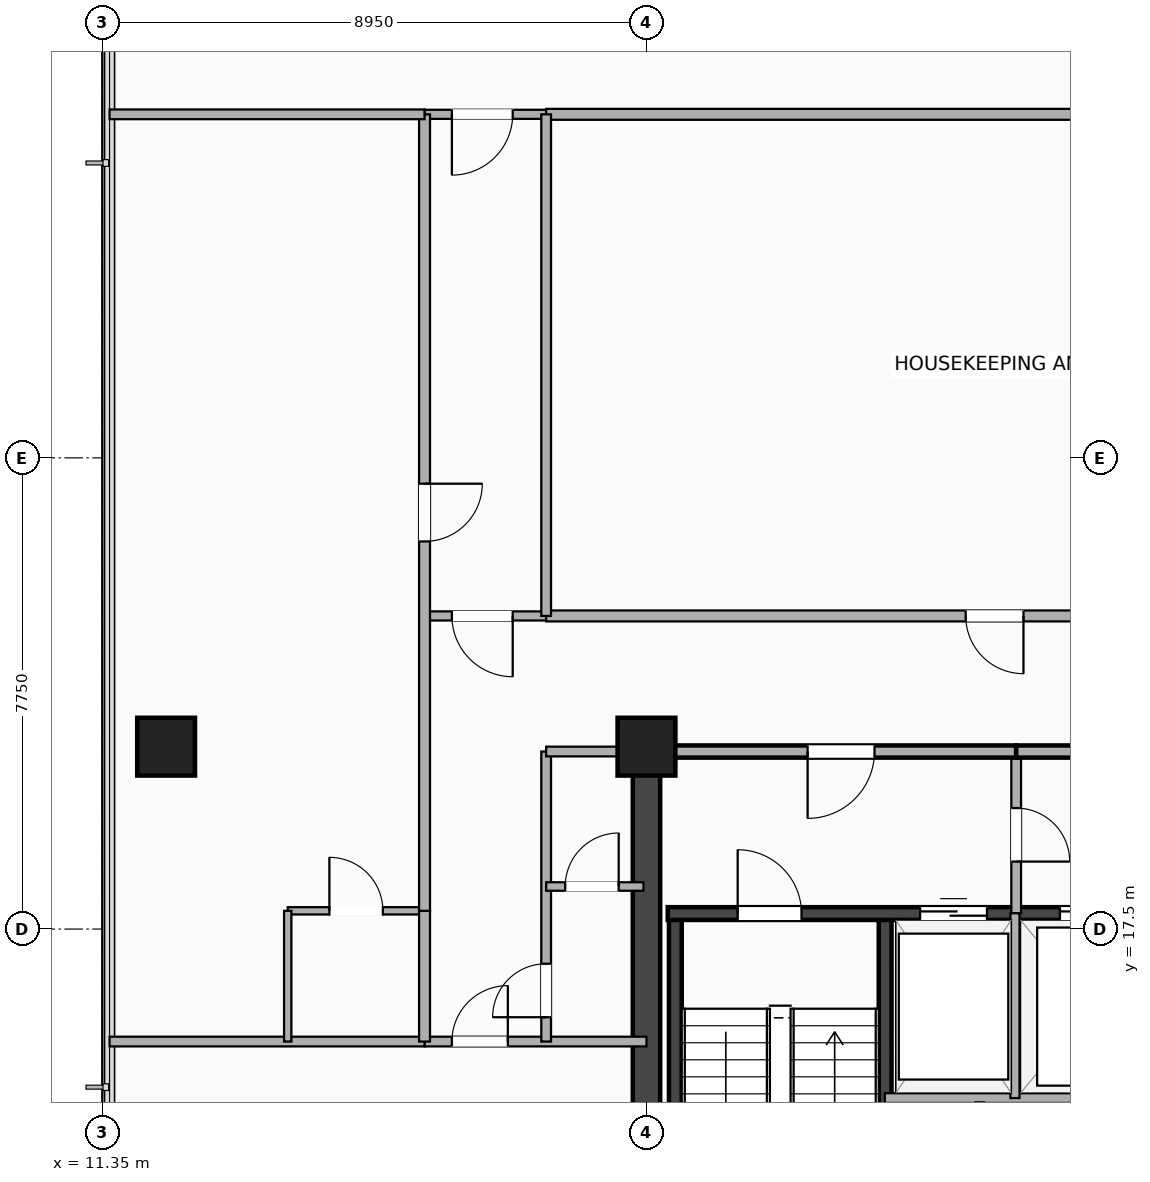
"""IFC4 building model, lengths in metres.
Left out: names, types, materials, properties, quantities, classifications, styles, units other than length and angle.
Written with IfcOpenShell. Run it as: python <this file> out.ifc"""

import sys

from ifc_helpers import new_model, si_unit, direction, frame, frame_2d, origin, origin_2d, place, context, subcontext, project, spatial, rectangle, extrude, element, fill, save


model = new_model("IFC4")
c1 = context("Model", 3, precision=1e-05, world=origin(), true_north=direction((0.0, 1.0)))
c2 = subcontext(c1, "Body", "Model", "MODEL_VIEW")
j1 = project(units=[si_unit("LENGTHUNIT", "METRE"), si_unit("PLANEANGLEUNIT", "RADIAN")], contexts=[c1])
p1 = place(None, origin())
s1 = spatial("IfcSite", under=j1, at=p1, CompositionType="ELEMENT")
p2 = place(p1, origin())
s2 = spatial("IfcBuilding", under=s1, at=p2, CompositionType="ELEMENT")
p3 = place(p2, frame((0.0, 0.0, 224.9)))
s3 = spatial("IfcBuildingStorey", under=s2, at=p3, CompositionType="ELEMENT", Elevation=224.9)
p4 = place(p3, frame((20.3, 3.5, 0.0), z_axis=(0.0, 0.0, 1.0), x_axis=(0.0, 1.0, 0.0)))
e1 = element("IfcWall", 1, at=p4, inside=s3, PredefinedType="SHEAR", context=c2, shape_type="SweptSolid", body=[
    extrude(rectangle(XDim=16.9, YDim=0.45, at=frame_2d((8.45, 0.0))), origin(), (0.0, 0.0, 1.0), 3.26),
])
for number, where, z_axis, x_axis in (
    (2, (20.775, 9.745, 0.0), (0.0, 0.0, 1.0), (0.0, 1.0, 0.0)),
    (3, (24.225, 9.745, 0.0), (0.0, 0.0, 1.0), (0.0, 1.0, 0.0)),
):
    element("IfcWall", number, at=place(p3, frame(where, z_axis=z_axis, x_axis=x_axis)), inside=s3, PredefinedType="SHEAR", context=c2, shape_type="SweptSolid", body=[
        extrude(rectangle(XDim=8.01, YDim=0.21, at=frame_2d((4.005, 0.0))), origin(), (0.0, 0.0, 1.0), 3.26),
    ])
p5 = place(p3, frame((20.65, 17.755, 0.0), z_axis=(0.0, 0.0, 1.0), x_axis=(1.0, 0.0, 0.0)))
e4 = element("IfcWall", 4, at=p5, inside=s3, PredefinedType="SHEAR", context=c2, shape_type="SweptSolid", body=[
    extrude(rectangle(XDim=8.3, YDim=0.21, at=frame_2d((4.15, 0.0))), origin(), (0.0, 0.0, 1.0), 3.26),
])
p6 = place(p5, frame((2.2, 0.0, 0.0), z_axis=(0.0, 0.0, 1.0), x_axis=(-1.0, 0.0, 0.0)))
e5 = element("IfcOpeningElement", 5, at=p6, cuts=e4, PredefinedType="OPENING", context=c2, shape_type="SweptSolid", body=[
    extrude(rectangle(XDim=1.05, YDim=2.15, at=frame_2d((0.525, 1.075))), frame((0.0, 0.115, 0.0), z_axis=(0.0, -1.0, 0.0), x_axis=(1.0, 0.0, 0.0)), (0.0, 0.0, 1.0), 0.23),
])
p7 = place(p5, frame((4.15, 0.0, 0.0)))
e6 = element("IfcOpeningElement", 6, at=p7, cuts=e4, PredefinedType="OPENING", context=c2, shape_type="SweptSolid", body=[
    extrude(rectangle(XDim=1.1, YDim=2.18, at=frame_2d((0.55, 1.09))), frame((0.0, 0.115, 0.0), z_axis=(0.0, -1.0, 0.0), x_axis=(1.0, 0.0, 0.0)), (0.0, 0.0, 1.0), 0.23),
])
p8 = place(p5, frame((6.45, 0.0, 0.0)))
e7 = element("IfcOpeningElement", 7, at=p8, cuts=e4, PredefinedType="OPENING", context=c2, shape_type="SweptSolid", body=[
    extrude(rectangle(XDim=1.12, YDim=2.2, at=frame_2d((0.56, 1.1))), frame((0.0, 0.115, 0.0), z_axis=(0.0, -1.0, 0.0), x_axis=(1.0, 0.0, 0.0)), (0.0, 0.0, 1.0), 0.23),
])
for number, where, z_axis, x_axis in (
    (8, (20.3, 20.5, -0.24), (0.0, 0.0, 1.0), (1.0, 0.0, 0.0)),
    (9, (12.4, 20.5, -0.24), (0.0, 0.0, 1.0), (1.0, 0.0, 0.0)),
):
    element("IfcColumn", number, at=place(p3, frame(where, z_axis=z_axis, x_axis=x_axis)), inside=s3, PredefinedType="COLUMN", context=c2, shape_type="SweptSolid", body=[
        extrude(rectangle(XDim=0.95, YDim=0.95, at=origin_2d()), origin(), (0.0, 0.0, 1.0), 3.5),
    ])
p9 = place(p3, frame((26.38, 17.76, 0.0), z_axis=(0.0, 0.0, 1.0), x_axis=(0.0, 1.0, 0.0)))
e10 = element("IfcWall", 10, at=p9, inside=s3, PredefinedType="PARTITIONING", context=c2, shape_type="SweptSolid", body=[
    extrude(rectangle(XDim=2.66, YDim=0.16, at=frame_2d((1.33, 0.0))), origin(), (0.0, 0.0, 1.0), 2.706),
])
p10 = place(p9, frame((0.85, 0.0, 0.0)))
e11 = element("IfcOpeningElement", 11, at=p10, cuts=e10, PredefinedType="OPENING", context=c2, shape_type="SweptSolid", body=[
    extrude(rectangle(XDim=0.88, YDim=2.08, at=frame_2d((0.44, 1.04))), frame((0.0, 0.09, 0.0), z_axis=(0.0, -1.0, 0.0), x_axis=(1.0, 0.0, 0.0)), (0.0, 0.0, 1.0), 0.18),
])
p11 = place(p3, frame((24.22, 14.72, 0.0), z_axis=(0.0, 0.0, 1.0), x_axis=(1.0, 0.0, 0.0)))
e12 = element("IfcWall", 12, at=p11, inside=s3, PredefinedType="PARTITIONING", context=c2, shape_type="SweptSolid", body=[
    extrude(rectangle(XDim=4.73, YDim=0.16, at=frame_2d((2.365, 0.0))), origin(), (0.0, 0.0, 1.0), 3.26),
])
p12 = place(p3, frame((26.36, 14.72, 0.0), z_axis=(0.0, 0.0, 1.0), x_axis=(0.0, 1.0, 0.0)))
e13 = element("IfcWall", 13, at=p12, inside=s3, PredefinedType="PARTITIONING", context=c2, shape_type="SweptSolid", body=[
    extrude(rectangle(XDim=3.04, YDim=0.15, at=frame_2d((1.52, 0.0))), origin(), (0.0, 0.0, 1.0), 3.26),
])
p13 = place(p3, frame((20.65, 20.42, 0.0), z_axis=(0.0, 0.0, 1.0), x_axis=(1.0, 0.0, 0.0)))
e14 = element("IfcWall", 14, at=p13, inside=s3, PredefinedType="PARTITIONING", context=c2, shape_type="SweptSolid", body=[
    extrude(rectangle(XDim=5.73, YDim=0.2, at=frame_2d((2.865, 0.0))), origin(), (0.0, 0.0, 1.0), 2.472),
])
p14 = place(p13, frame((2.3, 0.0, 0.0)))
e15 = element("IfcOpeningElement", 15, at=p14, cuts=e14, PredefinedType="OPENING", context=c2, shape_type="SweptSolid", body=[
    extrude(rectangle(XDim=1.1, YDim=2.15, at=frame_2d((0.55, 1.075))), frame((0.0, 0.11, 0.0), z_axis=(0.0, -1.0, 0.0), x_axis=(1.0, 0.0, 0.0)), (0.0, 0.0, 1.0), 0.22),
])
p15 = place(p3, frame((26.38, 20.42, 0.0), z_axis=(0.0, 0.0, 1.0), x_axis=(1.0, 0.0, 0.0)))
e16 = element("IfcWall", 16, at=p15, inside=s3, PredefinedType="PARTITIONING", context=c2, shape_type="SweptSolid", body=[
    extrude(rectangle(XDim=2.82, YDim=0.2, at=frame_2d((1.41, 0.0))), origin(), (0.0, 0.0, 1.0), 2.472),
])
p16 = place(p3, frame((16.65, 15.65, 0.0), z_axis=(0.0, 0.0, 1.0), x_axis=(1.0, 0.0, 0.0)))
e17 = element("IfcWall", 17, at=p16, inside=s3, PredefinedType="PARTITIONING", context=c2, shape_type="SweptSolid", body=[
    extrude(rectangle(XDim=3.65, YDim=0.16, at=frame_2d((1.825, 0.0))), origin(), (0.0, 0.0, 1.0), 2.472),
])
p17 = place(p16, frame((1.37, 0.0, 0.0), z_axis=(0.0, 0.0, 1.0), x_axis=(-1.0, 0.0, 0.0)))
e18 = element("IfcOpeningElement", 18, at=p17, cuts=e17, PredefinedType="OPENING", context=c2, shape_type="SweptSolid", body=[
    extrude(rectangle(XDim=0.92, YDim=2.08, at=frame_2d((0.46, 1.04))), frame((0.0, 0.09, 0.0), z_axis=(0.0, -1.0, 0.0), x_axis=(1.0, 0.0, 0.0)), (0.0, 0.0, 1.0), 0.18),
])
p18 = place(p3, frame((18.65, 15.65, 0.0), z_axis=(0.0, 0.0, 1.0), x_axis=(0.0, 1.0, 0.0)))
e19 = element("IfcWall", 19, at=p18, inside=s3, PredefinedType="PARTITIONING", context=c2, shape_type="SweptSolid", body=[
    extrude(rectangle(XDim=4.77, YDim=0.16, at=frame_2d((2.385, 0.0))), origin(), (0.0, 0.0, 1.0), 2.472),
])
p19 = place(p18, frame((1.28, 0.0, 0.0), z_axis=(0.0, 0.0, 1.0), x_axis=(-1.0, 0.0, 0.0)))
e20 = element("IfcOpeningElement", 20, at=p19, cuts=e19, PredefinedType="OPENING", context=c2, shape_type="SweptSolid", body=[
    extrude(rectangle(XDim=0.88, YDim=2.08, at=frame_2d((0.44, 1.04))), frame((0.0, 0.09, 0.0), z_axis=(0.0, -1.0, 0.0), x_axis=(1.0, 0.0, 0.0)), (0.0, 0.0, 1.0), 0.18),
])
p20 = place(p3, frame((18.65, 20.42, 0.0), z_axis=(0.0, 0.0, 1.0), x_axis=(1.0, 0.0, 0.0)))
e21 = element("IfcWall", 21, at=p20, inside=s3, PredefinedType="PARTITIONING", context=c2, shape_type="SweptSolid", body=[
    extrude(rectangle(XDim=1.65, YDim=0.16, at=frame_2d((0.825, 0.0))), origin(), (0.0, 0.0, 1.0), 2.472),
])
p21 = place(p3, frame((16.65, 22.65, 0.0), z_axis=(0.0, 0.0, 1.0), x_axis=(1.0, 0.0, 0.0)))
e22 = element("IfcWall", 22, at=p21, inside=s3, PredefinedType="PARTITIONING", context=c2, shape_type="SweptSolid", body=[
    extrude(rectangle(XDim=2.0, YDim=0.15, at=frame_2d((1.0, 0.0))), origin(), (0.0, 0.0, 1.0), 3.26),
])
p22 = place(p21, frame((0.45, 0.0, 0.0)))
e23 = element("IfcOpeningElement", 23, at=p22, cuts=e22, PredefinedType="OPENING", context=c2, shape_type="SweptSolid", body=[
    extrude(rectangle(XDim=1.0, YDim=2.15, at=frame_2d((0.5, 1.075))), frame((0.0, 0.085, 0.0), z_axis=(0.0, -1.0, 0.0), x_axis=(1.0, 0.0, 0.0)), (0.0, 0.0, 1.0), 0.17),
])
p23 = place(p3, frame((16.65, 30.9, 0.0), z_axis=(0.0, 0.0, 1.0), x_axis=(1.0, 0.0, 0.0)))
e24 = element("IfcWall", 24, at=p23, inside=s3, PredefinedType="PARTITIONING", context=c2, shape_type="SweptSolid", body=[
    extrude(rectangle(XDim=2.0, YDim=0.15, at=frame_2d((1.0, 0.0))), origin(), (0.0, 0.0, 1.0), 3.26),
])
p24 = place(p23, frame((0.45, 0.0, 0.0)))
e25 = element("IfcOpeningElement", 25, at=p24, cuts=e24, PredefinedType="OPENING", context=c2, shape_type="SweptSolid", body=[
    extrude(rectangle(XDim=1.0, YDim=2.15, at=frame_2d((0.5, 1.075))), frame((0.0, 0.085, 0.0), z_axis=(0.0, -1.0, 0.0), x_axis=(1.0, 0.0, 0.0)), (0.0, 0.0, 1.0), 0.17),
])
p25 = place(p3, frame((18.65, 22.65, 0.0), z_axis=(0.0, 0.0, 1.0), x_axis=(1.0, 0.0, 0.0)))
e26 = element("IfcWall", 26, at=p25, inside=s3, PredefinedType="PARTITIONING", context=c2, shape_type="SweptSolid", body=[
    extrude(rectangle(XDim=14.75, YDim=0.18, at=frame_2d((7.375, 0.0))), origin(), (0.0, 0.0, 1.0), 2.472),
])
p26 = place(p25, frame((6.9, 0.0, 0.0)))
e27 = element("IfcOpeningElement", 27, at=p26, cuts=e26, PredefinedType="OPENING", context=c2, shape_type="SweptSolid", body=[
    extrude(rectangle(XDim=0.95, YDim=2.15, at=frame_2d((0.475, 1.075))), frame((0.0, 0.1, 0.0), z_axis=(0.0, -1.0, 0.0), x_axis=(1.0, 0.0, 0.0)), (0.0, 0.0, 1.0), 0.2),
])
p27 = place(p3, frame((18.65, 30.9, 0.0), z_axis=(0.0, 0.0, 1.0), x_axis=(1.0, 0.0, 0.0)))
e28 = element("IfcWall", 28, at=p27, inside=s3, PredefinedType="PARTITIONING", context=c2, shape_type="SweptSolid", body=[
    extrude(rectangle(XDim=14.75, YDim=0.18, at=frame_2d((7.375, 0.0))), origin(), (0.0, 0.0, 1.0), 2.472),
])
p28 = place(p3, frame((18.65, 22.65, 0.0), z_axis=(0.0, 0.0, 1.0), x_axis=(0.0, 1.0, 0.0)))
e29 = element("IfcWall", 29, at=p28, inside=s3, PredefinedType="PARTITIONING", context=c2, shape_type="SweptSolid", body=[
    extrude(rectangle(XDim=8.25, YDim=0.16, at=frame_2d((4.125, 0.0))), origin(), (0.0, 0.0, 1.0), 2.887),
])
p29 = place(p3, frame((11.47, 15.65, 0.0), z_axis=(0.0, 0.0, 1.0), x_axis=(1.0, 0.0, 0.0)))
e30 = element("IfcWall", 30, at=p29, inside=s3, PredefinedType="PARTITIONING", context=c2, shape_type="SweptSolid", body=[
    extrude(rectangle(XDim=5.18, YDim=0.16, at=frame_2d((2.59, 0.0))), origin(), (0.0, 0.0, 1.0), 2.782),
])
p30 = place(p3, frame((14.4, 17.8, 0.0), z_axis=(0.0, 0.0, 1.0), x_axis=(1.0, 0.0, 0.0)))
e31 = element("IfcWall", 31, at=p30, inside=s3, PredefinedType="PARTITIONING", context=c2, shape_type="SweptSolid", body=[
    extrude(rectangle(XDim=2.25, YDim=0.12, at=frame_2d((1.125, 0.0))), origin(), (0.0, 0.0, 1.0), 3.26),
])
p31 = place(p30, frame((1.565, 0.0, 0.0), z_axis=(0.0, 0.0, 1.0), x_axis=(-1.0, 0.0, 0.0)))
e32 = element("IfcOpeningElement", 32, at=p31, cuts=e31, PredefinedType="OPENING", context=c2, shape_type="SweptSolid", body=[
    extrude(rectangle(XDim=0.88, YDim=2.08, at=frame_2d((0.44, 1.04))), frame((0.0, 0.07, 0.0), z_axis=(0.0, -1.0, 0.0), x_axis=(1.0, 0.0, 0.0)), (0.0, 0.0, 1.0), 0.14),
])
p32 = place(p3, frame((14.4, 15.65, 0.0), z_axis=(0.0, 0.0, 1.0), x_axis=(0.0, 1.0, 0.0)))
e33 = element("IfcWall", 33, at=p32, inside=s3, PredefinedType="PARTITIONING", context=c2, shape_type="SweptSolid", body=[
    extrude(rectangle(XDim=2.15, YDim=0.12, at=frame_2d((1.075, 0.0))), origin(), (0.0, 0.0, 1.0), 2.998),
])
p33 = place(p3, frame((16.65, 15.65, 0.0), z_axis=(0.0, 0.0, 1.0), x_axis=(0.0, 1.0, 0.0)))
e34 = element("IfcWall", 34, at=p33, inside=s3, PredefinedType="PARTITIONING", context=c2, shape_type="SweptSolid", body=[
    extrude(rectangle(XDim=2.15, YDim=0.18, at=frame_2d((1.075, 0.0))), origin(), (0.0, 0.0, 1.0), 2.998),
])
p34 = place(p3, frame((16.65, 17.8, 0.0), z_axis=(0.0, 0.0, 1.0), x_axis=(0.0, 1.0, 0.0)))
e35 = element("IfcWall", 35, at=p34, inside=s3, PredefinedType="PARTITIONING", context=c2, shape_type="SweptSolid", body=[
    extrude(rectangle(XDim=13.1, YDim=0.18, at=frame_2d((6.55, 0.0))), origin(), (0.0, 0.0, 1.0), 2.472),
])
p35 = place(p34, frame((6.075, 0.0, 0.0)))
e36 = element("IfcOpeningElement", 36, at=p35, cuts=e35, PredefinedType="OPENING", context=c2, shape_type="SweptSolid", body=[
    extrude(rectangle(XDim=0.95, YDim=2.15, at=frame_2d((0.475, 1.075))), frame((0.0, 0.1, 0.0), z_axis=(0.0, -1.0, 0.0), x_axis=(1.0, 0.0, 0.0)), (0.0, 0.0, 1.0), 0.2),
])
p36 = place(p3, frame((11.47, 30.9, 0.0), z_axis=(0.0, 0.0, 1.0), x_axis=(1.0, 0.0, 0.0)))
e37 = element("IfcWall", 37, at=p36, inside=s3, PredefinedType="PARTITIONING", context=c2, shape_type="SweptSolid", body=[
    extrude(rectangle(XDim=5.18, YDim=0.16, at=frame_2d((2.59, 0.0))), origin(), (0.0, 0.0, 1.0), 2.782),
])
p37 = place(p3, frame((18.65, 18.2, 0.0), z_axis=(0.0, 0.0, 1.0), x_axis=(1.0, 0.0, 0.0)))
e38 = element("IfcWall", 38, at=p37, inside=s3, PredefinedType="PARTITIONING", context=c2, shape_type="SweptSolid", body=[
    extrude(rectangle(XDim=1.6, YDim=0.14, at=frame_2d((0.8, 0.0))), origin(), (0.0, 0.0, 1.0), 2.472),
])
p38 = place(p37, frame((1.193, 0.0, 0.0), z_axis=(0.0, 0.0, 1.0), x_axis=(-1.0, 0.0, 0.0)))
e39 = element("IfcOpeningElement", 39, at=p38, cuts=e38, PredefinedType="OPENING", context=c2, shape_type="SweptSolid", body=[
    extrude(rectangle(XDim=0.88, YDim=2.08, at=frame_2d((0.44, 1.04))), frame((0.0, 0.08, 0.0), z_axis=(0.0, -1.0, 0.0), x_axis=(1.0, 0.0, 0.0)), (0.0, 0.0, 1.0), 0.16),
])
p39 = place(p6, origin())
e40 = element("IfcDoor", 40, at=p39, inside=s3, OperationType="SINGLE_SWING_LEFT", PredefinedType="DOOR", context=c2, shape_type="SweptSolid", body=[
    extrude(rectangle(XDim=1.05, YDim=2.15, at=frame_2d((0.525, 1.075))), frame((0.0, 0.025, 0.0), z_axis=(0.0, -1.0, 0.0), x_axis=(1.0, 0.0, 0.0)), (0.0, 0.0, 1.0), 0.05),
])
fill(e5, e40)
p40 = place(p7, origin())
e41 = element("IfcDoor", 41, at=p40, inside=s3, OperationType="DOUBLE_DOOR_SLIDING", PredefinedType="DOOR", context=c2, shape_type="SweptSolid", body=[
    extrude(rectangle(XDim=1.1, YDim=2.18, at=frame_2d((0.55, 1.09))), frame((0.0, 0.025, 0.0), z_axis=(0.0, -1.0, 0.0), x_axis=(1.0, 0.0, 0.0)), (0.0, 0.0, 1.0), 0.05),
])
fill(e6, e41)
p41 = place(p8, origin())
e42 = element("IfcDoor", 42, at=p41, inside=s3, OperationType="DOUBLE_DOOR_SLIDING", PredefinedType="DOOR", context=c2, shape_type="SweptSolid", body=[
    extrude(rectangle(XDim=1.12, YDim=2.2, at=frame_2d((0.56, 1.1))), frame((0.0, 0.025, 0.0), z_axis=(0.0, -1.0, 0.0), x_axis=(1.0, 0.0, 0.0)), (0.0, 0.0, 1.0), 0.05),
])
fill(e7, e42)
p42 = place(p10, origin())
e43 = element("IfcDoor", 43, at=p42, inside=s3, OperationType="SINGLE_SWING_LEFT", PredefinedType="DOOR", context=c2, shape_type="SweptSolid", body=[
    extrude(rectangle(XDim=0.88, YDim=2.08, at=frame_2d((0.44, 1.04))), frame((0.0, 0.025, 0.0), z_axis=(0.0, -1.0, 0.0), x_axis=(1.0, 0.0, 0.0)), (0.0, 0.0, 1.0), 0.05),
])
fill(e11, e43)
p43 = place(p14, origin())
e44 = element("IfcDoor", 44, at=p43, inside=s3, OperationType="SINGLE_SWING_LEFT", PredefinedType="DOOR", context=c2, shape_type="SweptSolid", body=[
    extrude(rectangle(XDim=1.1, YDim=2.15, at=frame_2d((0.55, 1.075))), frame((0.0, 0.025, 0.0), z_axis=(0.0, -1.0, 0.0), x_axis=(1.0, 0.0, 0.0)), (0.0, 0.0, 1.0), 0.05),
])
fill(e15, e44)
p44 = place(p17, origin())
e45 = element("IfcDoor", 45, at=p44, inside=s3, OperationType="SINGLE_SWING_RIGHT", PredefinedType="DOOR", context=c2, shape_type="SweptSolid", body=[
    extrude(rectangle(XDim=0.92, YDim=2.08, at=frame_2d((0.46, 1.04))), frame((0.0, 0.025, 0.0), z_axis=(0.0, -1.0, 0.0), x_axis=(1.0, 0.0, 0.0)), (0.0, 0.0, 1.0), 0.05),
])
fill(e18, e45)
p45 = place(p19, origin())
e46 = element("IfcDoor", 46, at=p45, inside=s3, OperationType="SINGLE_SWING_LEFT", PredefinedType="DOOR", context=c2, shape_type="SweptSolid", body=[
    extrude(rectangle(XDim=0.88, YDim=2.08, at=frame_2d((0.44, 1.04))), frame((0.0, 0.025, 0.0), z_axis=(0.0, -1.0, 0.0), x_axis=(1.0, 0.0, 0.0)), (0.0, 0.0, 1.0), 0.05),
])
fill(e20, e46)
p46 = place(p22, origin())
e47 = element("IfcDoor", 47, at=p46, inside=s3, OperationType="SINGLE_SWING_RIGHT", PredefinedType="DOOR", context=c2, shape_type="SweptSolid", body=[
    extrude(rectangle(XDim=1.0, YDim=2.15, at=frame_2d((0.5, 1.075))), frame((0.0, 0.025, 0.0), z_axis=(0.0, -1.0, 0.0), x_axis=(1.0, 0.0, 0.0)), (0.0, 0.0, 1.0), 0.05),
])
fill(e23, e47)
p47 = place(p24, origin())
e48 = element("IfcDoor", 48, at=p47, inside=s3, OperationType="SINGLE_SWING_LEFT", PredefinedType="DOOR", context=c2, shape_type="SweptSolid", body=[
    extrude(rectangle(XDim=1.0, YDim=2.15, at=frame_2d((0.5, 1.075))), frame((0.0, 0.025, 0.0), z_axis=(0.0, -1.0, 0.0), x_axis=(1.0, 0.0, 0.0)), (0.0, 0.0, 1.0), 0.05),
])
fill(e25, e48)
p48 = place(p26, origin())
e49 = element("IfcDoor", 49, at=p48, inside=s3, OperationType="SINGLE_SWING_RIGHT", PredefinedType="DOOR", context=c2, shape_type="SweptSolid", body=[
    extrude(rectangle(XDim=0.95, YDim=2.15, at=frame_2d((0.475, 1.075))), frame((0.0, 0.025, 0.0), z_axis=(0.0, -1.0, 0.0), x_axis=(1.0, 0.0, 0.0)), (0.0, 0.0, 1.0), 0.05),
])
fill(e27, e49)
p49 = place(p31, origin())
e50 = element("IfcDoor", 50, at=p49, inside=s3, OperationType="SINGLE_SWING_LEFT", PredefinedType="DOOR", context=c2, shape_type="SweptSolid", body=[
    extrude(rectangle(XDim=0.88, YDim=2.08, at=frame_2d((0.44, 1.04))), frame((0.0, 0.025, 0.0), z_axis=(0.0, -1.0, 0.0), x_axis=(1.0, 0.0, 0.0)), (0.0, 0.0, 1.0), 0.05),
])
fill(e32, e50)
p50 = place(p35, origin())
e51 = element("IfcDoor", 51, at=p50, inside=s3, OperationType="SINGLE_SWING_RIGHT", PredefinedType="DOOR", context=c2, shape_type="SweptSolid", body=[
    extrude(rectangle(XDim=0.95, YDim=2.15, at=frame_2d((0.475, 1.075))), frame((0.0, 0.025, 0.0), z_axis=(0.0, -1.0, 0.0), x_axis=(1.0, 0.0, 0.0)), (0.0, 0.0, 1.0), 0.05),
])
fill(e36, e51)
p51 = place(p38, origin())
e52 = element("IfcDoor", 52, at=p51, inside=s3, OperationType="SINGLE_SWING_RIGHT", PredefinedType="DOOR", context=c2, shape_type="SweptSolid", body=[
    extrude(rectangle(XDim=0.88, YDim=2.08, at=frame_2d((0.44, 1.04))), frame((0.0, 0.025, 0.0), z_axis=(0.0, -1.0, 0.0), x_axis=(1.0, 0.0, 0.0)), (0.0, 0.0, 1.0), 0.05),
])
fill(e39, e52)
save(model, sys.argv[1])
